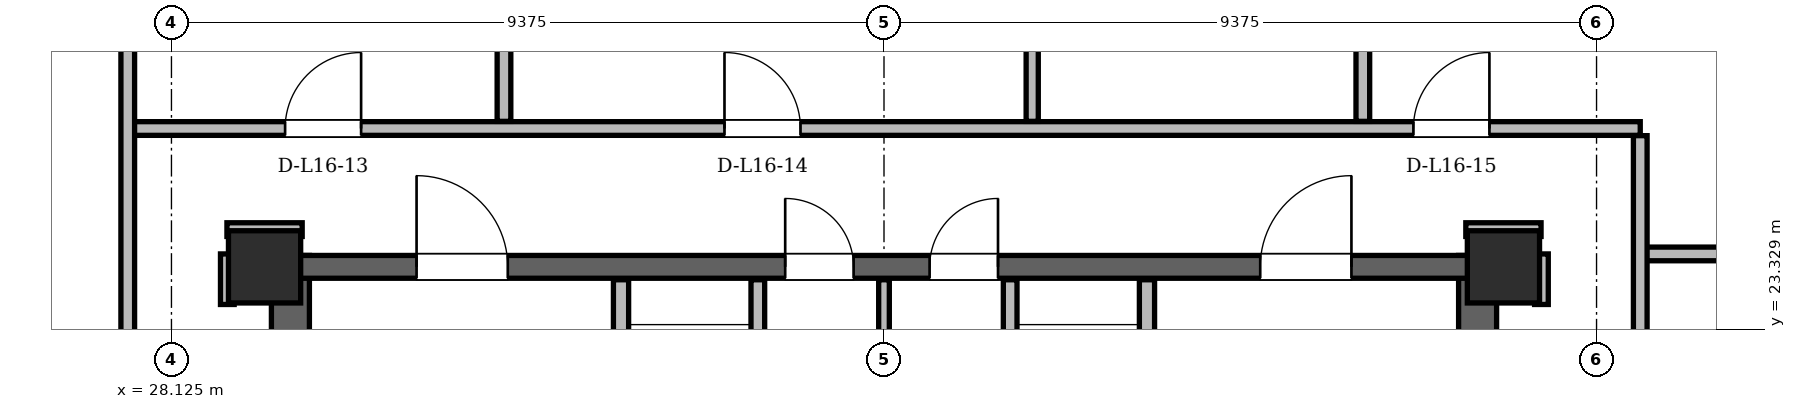
"""IFC4 building model, lengths in metres.
Left out: names, types, materials, properties, quantities, classifications, styles, units other than length and angle.
Written with IfcOpenShell. Run it as: python <this file> out.ifc"""

import sys

from ifc_helpers import new_model, si_unit, direction, frame, frame_2d, origin, origin_2d, place, context, subcontext, project, spatial, rectangle, hollow_rectangle, extrude, element, fill, save


model = new_model("IFC4")
c1 = context("Model", 3, precision=1e-05, world=origin(), true_north=direction((0.0, 1.0)))
c2 = subcontext(c1, "Body", "Model", "MODEL_VIEW")
j1 = project(units=[si_unit("LENGTHUNIT", "METRE"), si_unit("PLANEANGLEUNIT", "RADIAN")], contexts=[c1])
p1 = place(None, origin())
s1 = spatial("IfcSite", under=j1, at=p1, CompositionType="ELEMENT")
p2 = place(p1, origin())
s2 = spatial("IfcBuilding", under=s1, at=p2, CompositionType="ELEMENT")
p3 = place(p2, frame((0.0, 0.0, 63.3)))
s3 = spatial("IfcBuildingStorey", under=s2, at=p3, CompositionType="ELEMENT", Elevation=63.3)
for number, where, z_axis, x_axis in (
    (1, (45.65, 24.15, 0.0), (0.0, 0.0, 1.0), (1.0, 0.0, 0.0)),
    (2, (29.35, 24.15, 0.0), (0.0, 0.0, 1.0), (1.0, 0.0, 0.0)),
):
    element("IfcColumn", number, at=place(p3, frame(where, z_axis=z_axis, x_axis=x_axis)), inside=s3, PredefinedType="COLUMN", context=c2, shape_type="SweptSolid", body=[
        extrude(hollow_rectangle(XDim=0.95, YDim=0.95, WallThickness=0.08, at=origin_2d()), origin(), (0.0, 0.0, 1.0), 3.6),
    ])
for number, where, z_axis, x_axis in (
    (3, (29.69, 11.0, 0.0), (0.0, 0.0, 1.0), (0.0, 1.0, 0.0)),
    (4, (45.31, 11.0, 0.0), (0.0, 0.0, 1.0), (0.0, 1.0, 0.0)),
):
    element("IfcWall", number, at=place(p3, frame(where, z_axis=z_axis, x_axis=x_axis)), inside=s3, PredefinedType="SHEAR", context=c2, shape_type="SweptSolid", body=[
        extrude(rectangle(XDim=13.3, YDim=0.5, at=frame_2d((6.65, 0.0))), origin(), (0.0, 0.0, 1.0), 3.36),
    ])
p4 = place(p3, frame((29.65, 24.15, 0.0), z_axis=(0.0, 0.0, 1.0), x_axis=(1.0, 0.0, 0.0)))
e5 = element("IfcWall", 5, at=p4, inside=s3, PredefinedType="SHEAR", context=c2, shape_type="SweptSolid", body=[
    extrude(rectangle(XDim=15.7, YDim=0.3, at=frame_2d((7.85, 0.0))), origin(), (0.0, 0.0, 1.0), 3.36),
])
p5 = place(p4, frame((1.7, 0.0, 0.0)))
e6 = element("IfcOpeningElement", 6, at=p5, cuts=e5, PredefinedType="OPENING", context=c2, shape_type="SweptSolid", body=[
    extrude(rectangle(XDim=1.2, YDim=2.2, at=frame_2d((0.6, 1.1))), frame((0.0, 0.15, 0.0), z_axis=(0.0, -1.0, 0.0), x_axis=(1.0, 0.0, 0.0)), (0.0, 0.0, 1.0), 0.3),
])
p6 = place(p4, frame((12.8, 0.0, 0.0)))
e7 = element("IfcOpeningElement", 7, at=p6, cuts=e5, PredefinedType="OPENING", context=c2, shape_type="SweptSolid", body=[
    extrude(rectangle(XDim=1.2, YDim=2.2, at=frame_2d((0.6, 1.1))), frame((0.0, 0.15, 0.0), z_axis=(0.0, -1.0, 0.0), x_axis=(1.0, 0.0, 0.0)), (0.0, 0.0, 1.0), 0.3),
])
p7 = place(p4, frame((6.55, 0.0, 0.0)))
e8 = element("IfcOpeningElement", 8, at=p7, cuts=e5, PredefinedType="OPENING", context=c2, shape_type="SweptSolid", body=[
    extrude(rectangle(XDim=0.9, YDim=2.05, at=frame_2d((0.45, 1.025))), frame((0.0, 0.15, 0.0), z_axis=(0.0, -1.0, 0.0), x_axis=(1.0, 0.0, 0.0)), (0.0, 0.0, 1.0), 0.3),
])
p8 = place(p4, frame((8.45, 0.0, 0.0)))
e9 = element("IfcOpeningElement", 9, at=p8, cuts=e5, PredefinedType="OPENING", context=c2, shape_type="SweptSolid", body=[
    extrude(rectangle(XDim=0.9, YDim=2.05, at=frame_2d((0.45, 1.025))), frame((0.0, 0.15, 0.0), z_axis=(0.0, -1.0, 0.0), x_axis=(1.0, 0.0, 0.0)), (0.0, 0.0, 1.0), 0.3),
])
p9 = place(p3, frame((61.273, 14.383, 0.0), z_axis=(0.0, 0.0, 1.0), x_axis=(-0.500001933811, 0.866024287295, 0.0)))
e10 = element("IfcWall", 10, at=p9, inside=s3, PredefinedType="SOLIDWALL", context=c2, shape_type="SweptSolid", body=[
    extrude(rectangle(XDim=33.675, YDim=0.34, at=frame_2d((16.837, 0.0))), origin(), (0.0, 0.0, 1.0), 2.494),
])
p10 = place(p9, frame((7.615, 0.0, 0.0)))
e11 = element("IfcOpeningElement", 11, at=p10, cuts=e10, PredefinedType="OPENING", context=c2, shape_type="SweptSolid", body=[
    extrude(rectangle(XDim=1.5, YDim=2.2, at=frame_2d((0.75, 1.1))), frame((0.0, 0.17, 0.0), z_axis=(0.0, -1.0, 0.0), x_axis=(1.0, 0.0, 0.0)), (0.0, 0.0, 1.0), 0.34),
])
p11 = place(p9, frame((25.805, 0.0, 0.0)))
e12 = element("IfcOpeningElement", 12, at=p11, cuts=e10, PredefinedType="OPENING", context=c2, shape_type="SweptSolid", body=[
    extrude(rectangle(XDim=1.5, YDim=2.2, at=frame_2d((0.75, 1.1))), frame((0.0, 0.17, 0.0), z_axis=(0.0, -1.0, 0.0), x_axis=(1.0, 0.0, 0.0)), (0.0, 0.0, 1.0), 0.34),
])
p12 = place(p9, frame((1.57, 0.0, 0.85)))
e13 = element("IfcOpeningElement", 13, at=p12, cuts=e10, PredefinedType="OPENING", context=c2, shape_type="SweptSolid", body=[
    extrude(rectangle(XDim=1.4, YDim=1.534, at=frame_2d((0.7, 0.767))), frame((0.0, 0.17, 0.0), z_axis=(0.0, -1.0, 0.0), x_axis=(1.0, 0.0, 0.0)), (0.0, 0.0, 1.0), 0.34),
])
p13 = place(p9, frame((20.436, 0.0, 0.85)))
e14 = element("IfcOpeningElement", 14, at=p13, cuts=e10, PredefinedType="OPENING", context=c2, shape_type="SweptSolid", body=[
    extrude(rectangle(XDim=1.2, YDim=1.48, at=frame_2d((0.6, 0.74))), frame((0.0, 0.17, 0.0), z_axis=(0.0, -1.0, 0.0), x_axis=(1.0, 0.0, 0.0)), (0.0, 0.0, 1.0), 0.34),
])
p14 = place(p9, frame((29.61, 0.0, 0.85)))
e15 = element("IfcOpeningElement", 15, at=p14, cuts=e10, PredefinedType="OPENING", context=c2, shape_type="SweptSolid", body=[
    extrude(rectangle(XDim=2.2, YDim=1.534, at=frame_2d((1.1, 0.767))), frame((0.0, 0.17, 0.0), z_axis=(0.0, -1.0, 0.0), x_axis=(1.0, 0.0, 0.0)), (0.0, 0.0, 1.0), 0.34),
])
p15 = place(p9, frame((15.013, 0.0, 0.85)))
e16 = element("IfcOpeningElement", 16, at=p15, cuts=e10, PredefinedType="OPENING", context=c2, shape_type="SweptSolid", body=[
    extrude(rectangle(XDim=1.2, YDim=1.48, at=frame_2d((0.6, 0.74))), frame((0.0, 0.17, 0.0), z_axis=(0.0, -1.0, 0.0), x_axis=(1.0, 0.0, 0.0)), (0.0, 0.0, 1.0), 0.34),
])
p16 = place(p9, frame((17.765, 0.0, 0.85)))
e17 = element("IfcOpeningElement", 17, at=p16, cuts=e10, PredefinedType="OPENING", context=c2, shape_type="SweptSolid", body=[
    extrude(rectangle(XDim=1.2, YDim=1.48, at=frame_2d((0.6, 0.74))), frame((0.0, 0.17, 0.0), z_axis=(0.0, -1.0, 0.0), x_axis=(1.0, 0.0, 0.0)), (0.0, 0.0, 1.0), 0.34),
])
p17 = place(p3, frame((30.564, 43.546, 0.0), z_axis=(0.0, 0.0, 1.0), x_axis=(-0.500001933811, -0.866024287295, 0.0)))
e18 = element("IfcWall", 18, at=p17, inside=s3, PredefinedType="SOLIDWALL", context=c2, shape_type="SweptSolid", body=[
    extrude(rectangle(XDim=33.675, YDim=0.34, at=frame_2d((16.837, 0.0))), origin(), (0.0, 0.0, 1.0), 2.494),
])
p18 = place(p17, frame((7.714, 0.0, 0.0)))
e19 = element("IfcOpeningElement", 19, at=p18, cuts=e18, PredefinedType="OPENING", context=c2, shape_type="SweptSolid", body=[
    extrude(rectangle(XDim=1.3, YDim=2.2, at=frame_2d((0.65, 1.1))), frame((0.0, 0.17, 0.0), z_axis=(0.0, -1.0, 0.0), x_axis=(1.0, 0.0, 0.0)), (0.0, 0.0, 1.0), 0.34),
])
p19 = place(p17, frame((29.166, 0.0, 0.0)))
e20 = element("IfcOpeningElement", 20, at=p19, cuts=e18, PredefinedType="OPENING", context=c2, shape_type="SweptSolid", body=[
    extrude(rectangle(XDim=1.5, YDim=2.2, at=frame_2d((0.75, 1.1))), frame((0.0, 0.17, 0.0), z_axis=(0.0, -1.0, 0.0), x_axis=(1.0, 0.0, 0.0)), (0.0, 0.0, 1.0), 0.34),
])
p20 = place(p17, frame((12.072, 0.0, 0.85)))
e21 = element("IfcOpeningElement", 21, at=p20, cuts=e18, PredefinedType="OPENING", context=c2, shape_type="SweptSolid", body=[
    extrude(rectangle(XDim=1.8, YDim=1.534, at=frame_2d((0.9, 0.767))), frame((0.0, 0.17, 0.0), z_axis=(0.0, -1.0, 0.0), x_axis=(1.0, 0.0, 0.0)), (0.0, 0.0, 1.0), 0.34),
])
p21 = place(p17, frame((19.109, 0.0, 0.85)))
e22 = element("IfcOpeningElement", 22, at=p21, cuts=e18, PredefinedType="OPENING", context=c2, shape_type="SweptSolid", body=[
    extrude(rectangle(XDim=1.2, YDim=1.48, at=frame_2d((0.6, 0.74))), frame((0.0, 0.17, 0.0), z_axis=(0.0, -1.0, 0.0), x_axis=(1.0, 0.0, 0.0)), (0.0, 0.0, 1.0), 0.34),
])
p22 = place(p17, frame((1.232, 0.0, 0.85)))
e23 = element("IfcOpeningElement", 23, at=p22, cuts=e18, PredefinedType="OPENING", context=c2, shape_type="SweptSolid", body=[
    extrude(rectangle(XDim=1.8, YDim=1.534, at=frame_2d((0.9, 0.767))), frame((0.0, 0.17, 0.0), z_axis=(0.0, -1.0, 0.0), x_axis=(1.0, 0.0, 0.0)), (0.0, 0.0, 1.0), 0.34),
])
p23 = place(p3, frame((34.04, 19.48, 0.0), z_axis=(0.0, 0.0, 1.0), x_axis=(0.0, 1.0, 0.0)))
e24 = element("IfcWall", 24, at=p23, inside=s3, PredefinedType="PARTITIONING", context=c2, shape_type="SweptSolid", body=[
    extrude(rectangle(XDim=4.5, YDim=0.2, at=frame_2d((2.25, 0.0))), origin(), (0.0, 0.0, 1.0), 2.4),
])
p24 = place(p23, frame((2.12, 0.0, 0.0)))
e25 = element("IfcOpeningElement", 25, at=p24, cuts=e24, PredefinedType="OPENING", context=c2, shape_type="SweptSolid", body=[
    extrude(rectangle(XDim=1.1, YDim=2.2, at=frame_2d((0.55, 1.1))), frame((0.0, 0.1, 0.0), z_axis=(0.0, -1.0, 0.0), x_axis=(1.0, 0.0, 0.0)), (0.0, 0.0, 1.0), 0.2),
])
p25 = place(p3, frame((35.84, 20.96, 0.0), z_axis=(0.0, 0.0, 1.0), x_axis=(0.0, 1.0, 0.0)))
e26 = element("IfcWall", 26, at=p25, inside=s3, PredefinedType="PARTITIONING", context=c2, shape_type="SweptSolid", body=[
    extrude(rectangle(XDim=3.02, YDim=0.18, at=frame_2d((1.51, 0.0))), origin(), (0.0, 0.0, 1.0), 2.4),
])
p26 = place(p3, frame((40.96, 19.48, 0.0), z_axis=(0.0, 0.0, 1.0), x_axis=(0.0, 1.0, 0.0)))
e27 = element("IfcWall", 27, at=p26, inside=s3, PredefinedType="PARTITIONING", context=c2, shape_type="SweptSolid", body=[
    extrude(rectangle(XDim=4.5, YDim=0.2, at=frame_2d((2.25, 0.0))), origin(), (0.0, 0.0, 1.0), 2.4),
])
p27 = place(p26, frame((2.12, 0.0, 0.0)))
e28 = element("IfcOpeningElement", 28, at=p27, cuts=e27, PredefinedType="OPENING", context=c2, shape_type="SweptSolid", body=[
    extrude(rectangle(XDim=1.1, YDim=2.2, at=frame_2d((0.55, 1.1))), frame((0.0, 0.1, 0.0), z_axis=(0.0, -1.0, 0.0), x_axis=(1.0, 0.0, 0.0)), (0.0, 0.0, 1.0), 0.2),
])
p28 = place(p3, frame((39.16, 20.96, 0.0), z_axis=(0.0, 0.0, 1.0), x_axis=(0.0, 1.0, 0.0)))
e29 = element("IfcWall", 29, at=p28, inside=s3, PredefinedType="PARTITIONING", context=c2, shape_type="SweptSolid", body=[
    extrude(rectangle(XDim=3.02, YDim=0.18, at=frame_2d((1.51, 0.0))), origin(), (0.0, 0.0, 1.0), 2.4),
])
p29 = place(p3, frame((37.5, 21.06, 0.0), z_axis=(0.0, 0.0, 1.0), x_axis=(0.0, 1.0, 0.0)))
e30 = element("IfcWall", 30, at=p29, inside=s3, PredefinedType="PARTITIONING", context=c2, shape_type="SweptSolid", body=[
    extrude(rectangle(XDim=2.92, YDim=0.14, at=frame_2d((1.46, 0.0))), origin(), (0.0, 0.0, 1.0), 2.4),
])
p30 = place(p3, frame((47.45, 24.32, 0.0), z_axis=(0.0, 0.0, 1.0), x_axis=(1.0, 0.0, 0.0)))
e31 = element("IfcWall", 31, at=p30, inside=s3, PredefinedType="PARTITIONING", context=c2, shape_type="SweptSolid", body=[
    extrude(rectangle(XDim=7.885, YDim=0.18, at=frame_2d((3.943, 0.0))), origin(), (0.0, 0.0, 1.0), 3.36),
])
for number, where, z_axis, x_axis in (
    (32, (28.855, 24.64, 0.0), (0.0, 0.0, 1.0), (1.0, 0.0, 0.0)),
    (33, (45.155, 24.64, 0.0), (0.0, 0.0, 1.0), (1.0, 0.0, 0.0)),
):
    element("IfcWall", number, at=place(p3, frame(where, z_axis=z_axis, x_axis=x_axis)), inside=s3, PredefinedType="PARTITIONING", context=c2, shape_type="SweptSolid", body=[
        extrude(rectangle(XDim=0.99, YDim=0.18, at=frame_2d((0.495, 0.0))), origin(), (0.0, 0.0, 1.0), 2.738),
    ])
p31 = place(p3, frame((27.55, 25.97, 0.0), z_axis=(0.0, 0.0, 1.0), x_axis=(1.0, 0.0, 0.0)))
e34 = element("IfcWall", 34, at=p31, inside=s3, PredefinedType="PARTITIONING", context=c2, shape_type="SweptSolid", body=[
    extrude(rectangle(XDim=19.9, YDim=0.18, at=frame_2d((9.95, 0.0))), origin(), (0.0, 0.0, 1.0), 2.738),
])
p32 = place(p31, frame((2.07, 0.0, 0.0)))
e35 = element("IfcOpeningElement", 35, at=p32, cuts=e34, PredefinedType="OPENING", context=c2, shape_type="SweptSolid", body=[
    extrude(rectangle(XDim=1.0, YDim=2.18, at=frame_2d((0.5, 1.09))), frame((0.0, 0.09, 0.0), z_axis=(0.0, -1.0, 0.0), x_axis=(1.0, 0.0, 0.0)), (0.0, 0.0, 1.0), 0.18),
])
p33 = place(p31, frame((7.851, 0.0, 0.0)))
e36 = element("IfcOpeningElement", 36, at=p33, cuts=e34, PredefinedType="OPENING", context=c2, shape_type="SweptSolid", body=[
    extrude(rectangle(XDim=1.0, YDim=2.18, at=frame_2d((0.5, 1.09))), frame((0.0, 0.09, 0.0), z_axis=(0.0, -1.0, 0.0), x_axis=(1.0, 0.0, 0.0)), (0.0, 0.0, 1.0), 0.18),
])
p34 = place(p31, frame((16.916, 0.0, 0.0)))
e37 = element("IfcOpeningElement", 37, at=p34, cuts=e34, PredefinedType="OPENING", context=c2, shape_type="SweptSolid", body=[
    extrude(rectangle(XDim=1.0, YDim=2.18, at=frame_2d((0.5, 1.09))), frame((0.0, 0.09, 0.0), z_axis=(0.0, -1.0, 0.0), x_axis=(1.0, 0.0, 0.0)), (0.0, 0.0, 1.0), 0.18),
])
p35 = place(p3, frame((27.55, 11.044, 0.0), z_axis=(0.0, 0.0, 1.0), x_axis=(0.0, 1.0, 0.0)))
e38 = element("IfcWall", 38, at=p35, inside=s3, PredefinedType="PARTITIONING", context=c2, shape_type="SweptSolid", body=[
    extrude(rectangle(XDim=26.952, YDim=0.18, at=frame_2d((13.476, 0.0))), origin(), (0.0, 0.0, 1.0), 2.494),
])
p36 = place(p35, frame((10.795, 0.0, 0.0)))
e39 = element("IfcOpeningElement", 39, at=p36, cuts=e38, PredefinedType="OPENING", context=c2, shape_type="SweptSolid", body=[
    extrude(rectangle(XDim=1.0, YDim=2.18, at=frame_2d((0.5, 1.09))), frame((0.0, 0.09, 0.0), z_axis=(0.0, -1.0, 0.0), x_axis=(1.0, 0.0, 0.0)), (0.0, 0.0, 1.0), 0.18),
])
p37 = place(p3, frame((28.86, 23.655, 0.0), z_axis=(0.0, 0.0, 1.0), x_axis=(0.0, 1.0, 0.0)))
e40 = element("IfcWall", 40, at=p37, inside=s3, PredefinedType="PARTITIONING", context=c2, shape_type="SweptSolid", body=[
    extrude(rectangle(XDim=0.665, YDim=0.18, at=frame_2d((0.333, 0.0))), origin(), (0.0, 0.0, 1.0), 2.946),
])
p38 = place(p3, frame((32.5, 26.064, 0.0), z_axis=(0.0, 0.0, 1.0), x_axis=(0.0, 1.0, 0.0)))
e41 = element("IfcWall", 41, at=p38, inside=s3, PredefinedType="PARTITIONING", context=c2, shape_type="SweptSolid", body=[
    extrude(rectangle(XDim=17.309, YDim=0.18, at=frame_2d((8.654, 0.0))), origin(), (0.0, 0.0, 1.0), 3.36),
])
p39 = place(p3, frame((39.45, 26.064, 0.0), z_axis=(0.0, 0.0, 1.0), x_axis=(0.0, 1.0, 0.0)))
e42 = element("IfcWall", 42, at=p39, inside=s3, PredefinedType="PARTITIONING", context=c2, shape_type="SweptSolid", body=[
    extrude(rectangle(XDim=17.309, YDim=0.16, at=frame_2d((8.654, 0.0))), origin(), (0.0, 0.0, 1.0), 3.36),
])
p40 = place(p39, frame((1.443, 0.0, 0.0)))
e43 = element("IfcOpeningElement", 43, at=p40, cuts=e42, PredefinedType="OPENING", context=c2, shape_type="SweptSolid", body=[
    extrude(rectangle(XDim=0.92, YDim=2.12, at=frame_2d((0.46, 1.06))), frame((0.0, 0.08, 0.0), z_axis=(0.0, -1.0, 0.0), x_axis=(1.0, 0.0, 0.0)), (0.0, 0.0, 1.0), 0.16),
])
p41 = place(p39, frame((5.363, 0.0, 0.0)))
e44 = element("IfcOpeningElement", 44, at=p41, cuts=e42, PredefinedType="OPENING", context=c2, shape_type="SweptSolid", body=[
    extrude(rectangle(XDim=0.92, YDim=2.12, at=frame_2d((0.46, 1.06))), frame((0.0, 0.08, 0.0), z_axis=(0.0, -1.0, 0.0), x_axis=(1.0, 0.0, 0.0)), (0.0, 0.0, 1.0), 0.16),
])
p42 = place(p39, frame((8.727, 0.0, 0.0)))
e45 = element("IfcOpeningElement", 45, at=p42, cuts=e42, PredefinedType="OPENING", context=c2, shape_type="SweptSolid", body=[
    extrude(rectangle(XDim=0.95, YDim=2.1, at=frame_2d((0.475, 1.05))), frame((0.0, 0.08, 0.0), z_axis=(0.0, -1.0, 0.0), x_axis=(1.0, 0.0, 0.0)), (0.0, 0.0, 1.0), 0.16),
])
p43 = place(p39, frame((11.566, 0.0, 0.0)))
e46 = element("IfcOpeningElement", 46, at=p43, cuts=e42, PredefinedType="OPENING", context=c2, shape_type="SweptSolid", body=[
    extrude(rectangle(XDim=0.95, YDim=2.1, at=frame_2d((0.475, 1.05))), frame((0.0, 0.08, 0.0), z_axis=(0.0, -1.0, 0.0), x_axis=(1.0, 0.0, 0.0)), (0.0, 0.0, 1.0), 0.16),
])
p44 = place(p39, frame((13.942, 0.0, 0.0)))
e47 = element("IfcOpeningElement", 47, at=p44, cuts=e42, PredefinedType="OPENING", context=c2, shape_type="SweptSolid", body=[
    extrude(rectangle(XDim=0.95, YDim=2.1, at=frame_2d((0.475, 1.05))), frame((0.0, 0.08, 0.0), z_axis=(0.0, -1.0, 0.0), x_axis=(1.0, 0.0, 0.0)), (0.0, 0.0, 1.0), 0.16),
])
p45 = place(p39, frame((15.962, 0.0, 0.0)))
e48 = element("IfcOpeningElement", 48, at=p45, cuts=e42, PredefinedType="OPENING", context=c2, shape_type="SweptSolid", body=[
    extrude(rectangle(XDim=0.88, YDim=2.08, at=frame_2d((0.44, 1.04))), frame((0.0, 0.08, 0.0), z_axis=(0.0, -1.0, 0.0), x_axis=(1.0, 0.0, 0.0)), (0.0, 0.0, 1.0), 0.16),
])
p46 = place(p3, frame((43.8, 26.064, 0.0), z_axis=(0.0, 0.0, 1.0), x_axis=(0.0, 1.0, 0.0)))
e49 = element("IfcWall", 49, at=p46, inside=s3, PredefinedType="PARTITIONING", context=c2, shape_type="SweptSolid", body=[
    extrude(rectangle(XDim=17.309, YDim=0.18, at=frame_2d((8.654, 0.0))), origin(), (0.0, 0.0, 1.0), 3.36),
])
p47 = place(p3, frame((46.15, 23.655, 0.0), z_axis=(0.0, 0.0, 1.0), x_axis=(0.0, 1.0, 0.0)))
e50 = element("IfcWall", 50, at=p47, inside=s3, PredefinedType="PARTITIONING", context=c2, shape_type="SweptSolid", body=[
    extrude(rectangle(XDim=0.665, YDim=0.18, at=frame_2d((0.333, 0.0))), origin(), (0.0, 0.0, 1.0), 2.946),
])
p48 = place(p3, frame((47.45, 11.044, 0.0), z_axis=(0.0, 0.0, 1.0), x_axis=(0.0, 1.0, 0.0)))
e51 = element("IfcWall", 51, at=p48, inside=s3, PredefinedType="PARTITIONING", context=c2, shape_type="SweptSolid", body=[
    extrude(rectangle(XDim=14.832, YDim=0.18, at=frame_2d((7.416, 0.0))), origin(), (0.0, 0.0, 1.0), 2.738),
])
p49 = place(p48, frame((6.079, 0.0, 0.0)))
e52 = element("IfcOpeningElement", 52, at=p49, cuts=e51, PredefinedType="OPENING", context=c2, shape_type="SweptSolid", body=[
    extrude(rectangle(XDim=1.0, YDim=2.18, at=frame_2d((0.5, 1.09))), frame((0.0, 0.09, 0.0), z_axis=(0.0, -1.0, 0.0), x_axis=(1.0, 0.0, 0.0)), (0.0, 0.0, 1.0), 0.18),
])
p50 = place(p48, frame((10.668, 0.0, 0.0)))
e53 = element("IfcOpeningElement", 53, at=p50, cuts=e51, PredefinedType="OPENING", context=c2, shape_type="SweptSolid", body=[
    extrude(rectangle(XDim=1.0, YDim=2.18, at=frame_2d((0.5, 1.09))), frame((0.0, 0.09, 0.0), z_axis=(0.0, -1.0, 0.0), x_axis=(1.0, 0.0, 0.0)), (0.0, 0.0, 1.0), 0.18),
])
p51 = place(p5, origin())
e54 = element("IfcDoor", 54, at=p51, inside=s3, OperationType="SINGLE_SWING_LEFT", PredefinedType="DOOR", context=c2, shape_type="SweptSolid", body=[
    extrude(rectangle(XDim=1.2, YDim=2.2, at=frame_2d((0.6, 1.1))), frame((0.0, 0.025, 0.0), z_axis=(0.0, -1.0, 0.0), x_axis=(1.0, 0.0, 0.0)), (0.0, 0.0, 1.0), 0.05),
])
fill(e6, e54)
p52 = place(p6, origin())
e55 = element("IfcDoor", 55, at=p52, inside=s3, OperationType="SINGLE_SWING_RIGHT", PredefinedType="DOOR", context=c2, shape_type="SweptSolid", body=[
    extrude(rectangle(XDim=1.2, YDim=2.2, at=frame_2d((0.6, 1.1))), frame((0.0, 0.025, 0.0), z_axis=(0.0, -1.0, 0.0), x_axis=(1.0, 0.0, 0.0)), (0.0, 0.0, 1.0), 0.05),
])
fill(e7, e55)
p53 = place(p7, origin())
e56 = element("IfcDoor", 56, at=p53, inside=s3, OperationType="SINGLE_SWING_LEFT", PredefinedType="DOOR", context=c2, shape_type="SweptSolid", body=[
    extrude(rectangle(XDim=0.9, YDim=2.05, at=frame_2d((0.45, 1.025))), frame((0.0, 0.025, 0.0), z_axis=(0.0, -1.0, 0.0), x_axis=(1.0, 0.0, 0.0)), (0.0, 0.0, 1.0), 0.05),
])
fill(e8, e56)
p54 = place(p8, origin())
e57 = element("IfcDoor", 57, at=p54, inside=s3, OperationType="SINGLE_SWING_RIGHT", PredefinedType="DOOR", context=c2, shape_type="SweptSolid", body=[
    extrude(rectangle(XDim=0.9, YDim=2.05, at=frame_2d((0.45, 1.025))), frame((0.0, 0.025, 0.0), z_axis=(0.0, -1.0, 0.0), x_axis=(1.0, 0.0, 0.0)), (0.0, 0.0, 1.0), 0.05),
])
fill(e9, e57)
p55 = place(p32, origin())
e58 = element("IfcDoor", 58, at=p55, inside=s3, OperationType="SINGLE_SWING_RIGHT", PredefinedType="DOOR", context=c2, shape_type="SweptSolid", body=[
    extrude(rectangle(XDim=1.0, YDim=2.18, at=frame_2d((0.5, 1.09))), frame((0.0, 0.025, 0.0), z_axis=(0.0, -1.0, 0.0), x_axis=(1.0, 0.0, 0.0)), (0.0, 0.0, 1.0), 0.05),
])
fill(e35, e58)
p56 = place(p33, origin())
e59 = element("IfcDoor", 59, at=p56, inside=s3, OperationType="SINGLE_SWING_LEFT", PredefinedType="DOOR", context=c2, shape_type="SweptSolid", body=[
    extrude(rectangle(XDim=1.0, YDim=2.18, at=frame_2d((0.5, 1.09))), frame((0.0, 0.025, 0.0), z_axis=(0.0, -1.0, 0.0), x_axis=(1.0, 0.0, 0.0)), (0.0, 0.0, 1.0), 0.05),
])
fill(e36, e59)
p57 = place(p34, origin())
e60 = element("IfcDoor", 60, at=p57, inside=s3, OperationType="SINGLE_SWING_RIGHT", PredefinedType="DOOR", context=c2, shape_type="SweptSolid", body=[
    extrude(rectangle(XDim=1.0, YDim=2.18, at=frame_2d((0.5, 1.09))), frame((0.0, 0.025, 0.0), z_axis=(0.0, -1.0, 0.0), x_axis=(1.0, 0.0, 0.0)), (0.0, 0.0, 1.0), 0.05),
])
fill(e37, e60)
save(model, sys.argv[1])
